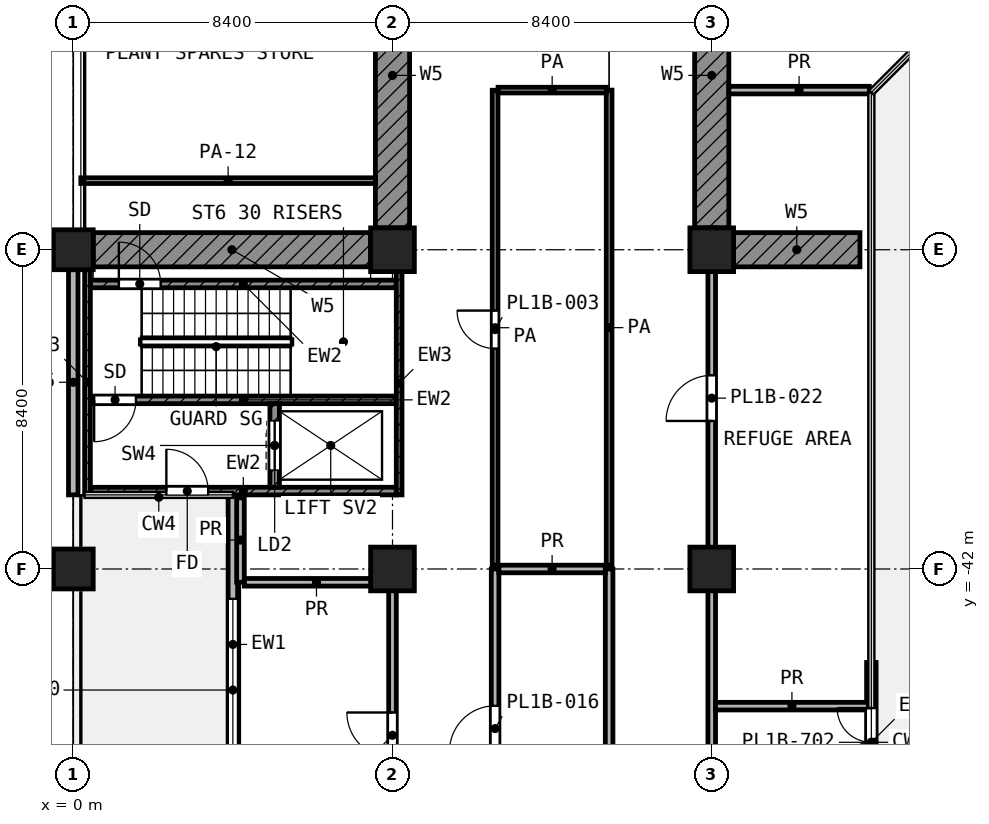
"""IFC4 building model, lengths in metres.
Left out: names, types, materials, properties, quantities, classifications, styles, units other than length and angle.
Written with IfcOpenShell. Run it as: python <this file> out.ifc"""

import sys

from ifc_helpers import new_model, si_unit, direction, frame, frame_2d, origin, origin_2d, place, context, subcontext, project, spatial, rectangle, extrude, element, fill, save


model = new_model("IFC4")
c1 = context("Model", 3, precision=1e-05, world=origin(), true_north=direction((0.0, 1.0)))
c2 = subcontext(c1, "Body", "Model", "MODEL_VIEW")
j1 = project(units=[si_unit("LENGTHUNIT", "METRE"), si_unit("PLANEANGLEUNIT", "RADIAN")], contexts=[c1])
p1 = place(None, origin())
s1 = spatial("IfcSite", under=j1, at=p1, CompositionType="ELEMENT")
p2 = place(p1, origin())
s2 = spatial("IfcBuilding", under=s1, at=p2, CompositionType="ELEMENT")
p3 = place(p2, frame((0.0, 0.0, 93.8)))
s3 = spatial("IfcBuildingStorey", under=s2, at=p3, CompositionType="ELEMENT", Elevation=93.8)
p4 = place(p3, frame((0.0, -33.6, 0.0), z_axis=(0.0, 0.0, 1.0), x_axis=(1.0, 0.0, 0.0)))
e1 = element("IfcColumn", 1, at=p4, inside=s3, PredefinedType="COLUMN", context=c2, shape_type="SweptSolid", body=[
    extrude(rectangle(XDim=1.05, YDim=1.05, at=origin_2d()), origin(), (0.0, 0.0, 1.0), 5.0),
])
for number, where, z_axis, x_axis in (
    (2, (8.4, -33.6, 0.0), (0.0, 0.0, 1.0), (1.0, 0.0, 0.0)),
    (3, (16.8, -33.6, 0.0), (0.0, 0.0, 1.0), (1.0, 0.0, 0.0)),
):
    element("IfcColumn", number, at=place(p3, frame(where, z_axis=z_axis, x_axis=x_axis)), inside=s3, PredefinedType="COLUMN", context=c2, shape_type="SweptSolid", body=[
        extrude(rectangle(XDim=1.15, YDim=1.15, at=origin_2d()), origin(), (0.0, 0.0, 1.0), 5.0),
    ])
p5 = place(p3, frame((0.0, -42.0, 0.0), z_axis=(0.0, 0.0, 1.0), x_axis=(1.0, 0.0, 0.0)))
e4 = element("IfcColumn", 4, at=p5, inside=s3, PredefinedType="COLUMN", context=c2, shape_type="SweptSolid", body=[
    extrude(rectangle(XDim=1.05, YDim=1.05, at=origin_2d()), origin(), (0.0, 0.0, 1.0), 5.0),
])
for number, where, z_axis, x_axis in (
    (5, (8.4, -42.0, 0.0), (0.0, 0.0, 1.0), (1.0, 0.0, 0.0)),
    (6, (16.8, -42.0, 0.0), (0.0, 0.0, 1.0), (1.0, 0.0, 0.0)),
):
    element("IfcColumn", number, at=place(p3, frame(where, z_axis=z_axis, x_axis=x_axis)), inside=s3, PredefinedType="COLUMN", context=c2, shape_type="SweptSolid", body=[
        extrude(rectangle(XDim=1.15, YDim=1.15, at=origin_2d()), origin(), (0.0, 0.0, 1.0), 5.0),
    ])
for number, where, z_axis, x_axis in (
    (7, (8.4, -25.0, 0.0), (0.0, 0.0, 1.0), (0.0, -1.0, 0.0)),
    (8, (16.8, -25.0, 0.0), (0.0, 0.0, 1.0), (0.0, -1.0, 0.0)),
):
    element("IfcWall", number, at=place(p3, frame(where, z_axis=z_axis, x_axis=x_axis)), inside=s3, PredefinedType="SHEAR", context=c2, shape_type="SweptSolid", body=[
        extrude(rectangle(XDim=8.025, YDim=0.9, at=frame_2d((4.012, 0.0))), origin(), (0.0, 0.0, 1.0), 4.4),
    ])
p6 = place(p3, frame((0.525, -33.6, 0.0), z_axis=(0.0, 0.0, 1.0), x_axis=(1.0, 0.0, 0.0)))
e9 = element("IfcWall", 9, at=p6, inside=s3, PredefinedType="SHEAR", context=c2, shape_type="SweptSolid", body=[
    extrude(rectangle(XDim=7.3, YDim=0.9, at=frame_2d((3.65, 0.0))), origin(), (0.0, 0.0, 1.0), 4.4),
])
p7 = place(p3, frame((17.375, -33.6, 0.0), z_axis=(0.0, 0.0, 1.0), x_axis=(1.0, 0.0, 0.0)))
e10 = element("IfcWall", 10, at=p7, inside=s3, PredefinedType="SHEAR", context=c2, shape_type="SweptSolid", body=[
    extrude(rectangle(XDim=3.325, YDim=0.9, at=frame_2d((1.663, 0.0))), origin(), (0.0, 0.0, 1.0), 4.4),
])
p8 = place(p3, frame((0.0, -34.125, 0.0), z_axis=(0.0, 0.0, 1.0), x_axis=(0.0, -1.0, 0.0)))
e11 = element("IfcWall", 11, at=p8, inside=s3, PredefinedType="SOLIDWALL", context=c2, shape_type="SweptSolid", body=[
    extrude(rectangle(XDim=5.925, YDim=0.25, at=frame_2d((2.962, 0.0))), origin(), (0.0, 0.0, 1.0), 3.0),
])
p9 = place(p3, frame((4.2, -40.05, 0.0), z_axis=(0.0, 0.0, 1.0), x_axis=(0.0, -1.0, 0.0)))
e12 = element("IfcWall", 12, at=p9, inside=s3, PredefinedType="SOLIDWALL", context=c2, shape_type="SweptSolid", body=[
    extrude(rectangle(XDim=7.87, YDim=0.25, at=frame_2d((3.935, 0.0))), origin(), (0.0, 0.0, 1.0), 4.4),
])
p10 = place(p9, frame((2.735, 0.0, 0.6)))
e13 = element("IfcOpeningElement", 13, at=p10, cuts=e12, PredefinedType="OPENING", context=c2, shape_type="SweptSolid", body=[
    extrude(rectangle(XDim=4.8, YDim=2.4, at=frame_2d((2.4, 1.2))), frame((0.0, 0.135, 0.0), z_axis=(0.0, -1.0, 0.0), x_axis=(1.0, 0.0, 0.0)), (0.0, 0.0, 1.0), 0.27),
])
p11 = place(p3, frame((21.0, -48.66, 0.0), z_axis=(0.0, 0.0, 1.0), x_axis=(0.0, 1.0, 0.0)))
e14 = element("IfcWall", 14, at=p11, inside=s3, PredefinedType="SOLIDWALL", context=c2, shape_type="SweptSolid", body=[
    extrude(rectangle(XDim=4.2, YDim=0.25, at=frame_2d((2.1, 0.0))), origin(), (0.0, 0.0, 1.0), 4.24),
])
p12 = place(p11, frame((1.2, 0.0, 0.0)))
e15 = element("IfcOpeningElement", 15, at=p12, cuts=e14, PredefinedType="OPENING", context=c2, shape_type="SweptSolid", body=[
    extrude(rectangle(XDim=1.8, YDim=2.1, at=frame_2d((0.9, 1.05))), frame((0.0, 0.135, 0.0), z_axis=(0.0, -1.0, 0.0), x_axis=(1.0, 0.0, 0.0)), (0.0, 0.0, 1.0), 0.27),
])
p13 = place(p3, frame((0.375, -40.05, 0.0), z_axis=(0.0, 0.0, 1.0), x_axis=(0.0, 1.0, 0.0)))
e16 = element("IfcWall", 16, at=p13, inside=s3, PredefinedType="SHEAR", context=c2, shape_type="SweptSolid", body=[
    extrude(rectangle(XDim=5.925, YDim=0.15, at=frame_2d((2.962, 0.0))), origin(), (0.0, 0.0, 1.0), 4.4),
])
p14 = place(p3, frame((8.575, -40.05, 0.0), z_axis=(0.0, 0.0, 1.0), x_axis=(0.0, 1.0, 0.0)))
e17 = element("IfcWall", 17, at=p14, inside=s3, PredefinedType="SHEAR", context=c2, shape_type="SweptSolid", body=[
    extrude(rectangle(XDim=5.875, YDim=0.15, at=frame_2d((2.938, 0.0))), origin(), (0.0, 0.0, 1.0), 4.4),
])
p15 = place(p3, frame((0.45, -34.5, 0.0), z_axis=(0.0, 0.0, 1.0), x_axis=(1.0, 0.0, 0.0)))
e18 = element("IfcWall", 18, at=p15, inside=s3, PredefinedType="SHEAR", context=c2, shape_type="SweptSolid", body=[
    extrude(rectangle(XDim=8.05, YDim=0.2, at=frame_2d((4.025, 0.0))), origin(), (0.0, 0.0, 1.0), 4.4),
])
p16 = place(p15, frame((0.75, 0.0, 0.0)))
e19 = element("IfcOpeningElement", 19, at=p16, cuts=e18, PredefinedType="OPENING", context=c2, shape_type="SweptSolid", body=[
    extrude(rectangle(XDim=1.1, YDim=2.1, at=frame_2d((0.55, 1.05))), frame((0.0, 0.11, 0.0), z_axis=(0.0, -1.0, 0.0), x_axis=(1.0, 0.0, 0.0)), (0.0, 0.0, 1.0), 0.22),
])
p17 = place(p3, frame((0.45, -37.55, 0.0), z_axis=(0.0, 0.0, 1.0), x_axis=(1.0, 0.0, 0.0)))
e20 = element("IfcWall", 20, at=p17, inside=s3, PredefinedType="SHEAR", context=c2, shape_type="SweptSolid", body=[
    extrude(rectangle(XDim=8.05, YDim=0.2, at=frame_2d((4.025, 0.0))), origin(), (0.0, 0.0, 1.0), 4.4),
])
p18 = place(p17, frame((0.1, 0.0, 0.0)))
e21 = element("IfcOpeningElement", 21, at=p18, cuts=e20, PredefinedType="OPENING", context=c2, shape_type="SweptSolid", body=[
    extrude(rectangle(XDim=1.1, YDim=2.1, at=frame_2d((0.55, 1.05))), frame((0.0, 0.11, 0.0), z_axis=(0.0, -1.0, 0.0), x_axis=(1.0, 0.0, 0.0)), (0.0, 0.0, 1.0), 0.22),
])
p19 = place(p3, frame((0.45, -39.95, 0.0), z_axis=(0.0, 0.0, 1.0), x_axis=(1.0, 0.0, 0.0)))
e22 = element("IfcWall", 22, at=p19, inside=s3, PredefinedType="SHEAR", context=c2, shape_type="SweptSolid", body=[
    extrude(rectangle(XDim=8.05, YDim=0.2, at=frame_2d((4.025, 0.0))), origin(), (0.0, 0.0, 1.0), 4.4),
])
p20 = place(p19, frame((2.0, 0.0, 0.0)))
e23 = element("IfcOpeningElement", 23, at=p20, cuts=e22, PredefinedType="OPENING", context=c2, shape_type="SweptSolid", body=[
    extrude(rectangle(XDim=1.1, YDim=2.1, at=frame_2d((0.55, 1.05))), frame((0.0, 0.11, 0.0), z_axis=(0.0, -1.0, 0.0), x_axis=(1.0, 0.0, 0.0)), (0.0, 0.0, 1.0), 0.22),
])
p21 = place(p3, frame((5.3, -39.85, 0.0), z_axis=(0.0, 0.0, 1.0), x_axis=(0.0, 1.0, 0.0)))
e24 = element("IfcWall", 24, at=p21, inside=s3, PredefinedType="SHEAR", context=c2, shape_type="SweptSolid", body=[
    extrude(rectangle(XDim=2.2, YDim=0.25, at=frame_2d((1.1, 0.0))), origin(), (0.0, 0.0, 1.0), 4.4),
])
p22 = place(p21, frame((0.45, 0.0, 0.0)))
e25 = element("IfcOpeningElement", 25, at=p22, cuts=e24, PredefinedType="OPENING", context=c2, shape_type="SweptSolid", body=[
    extrude(rectangle(XDim=1.3, YDim=2.1, at=frame_2d((0.65, 1.05))), frame((0.0, 0.135, 0.0), z_axis=(0.0, -1.0, 0.0), x_axis=(1.0, 0.0, 0.0)), (0.0, 0.0, 1.0), 0.27),
])
p23 = place(p3, frame((0.2, -31.782, 0.0), z_axis=(0.0, 0.0, 1.0), x_axis=(1.0, 0.0, 0.0)))
e26 = element("IfcWall", 26, at=p23, inside=s3, PredefinedType="PARTITIONING", context=c2, shape_type="SweptSolid", body=[
    extrude(rectangle(XDim=7.751, YDim=0.15, at=frame_2d((3.875, 0.0))), origin(), (0.0, 0.0, 1.0), 3.0),
])
p24 = place(p3, frame((11.178, -29.4, 0.0), z_axis=(0.0, 0.0, 1.0), x_axis=(1.0, 0.0, 0.0)))
e27 = element("IfcWall", 27, at=p24, inside=s3, PredefinedType="PARTITIONING", context=c2, shape_type="SweptSolid", body=[
    extrude(rectangle(XDim=2.847, YDim=0.15, at=frame_2d((1.423, 0.0))), origin(), (0.0, 0.0, 1.0), 4.4),
])
p25 = place(p3, frame((11.1, -41.9, 0.0), z_axis=(0.0, 0.0, 1.0), x_axis=(0.0, 1.0, 0.0)))
e28 = element("IfcWall", 28, at=p25, inside=s3, PredefinedType="PARTITIONING", context=c2, shape_type="SweptSolid", body=[
    extrude(rectangle(XDim=12.497, YDim=0.15, at=frame_2d((6.249, 0.0))), origin(), (0.0, 0.0, 1.0), 4.4),
])
p26 = place(p25, frame((5.699, 0.0, 0.0)))
e29 = element("IfcOpeningElement", 29, at=p26, cuts=e28, PredefinedType="OPENING", context=c2, shape_type="SweptSolid", body=[
    extrude(rectangle(XDim=1.0, YDim=2.1, at=frame_2d((0.5, 1.05))), frame((0.0, 0.085, 0.0), z_axis=(0.0, -1.0, 0.0), x_axis=(1.0, 0.0, 0.0)), (0.0, 0.0, 1.0), 0.17),
])
p27 = place(p3, frame((14.1, -41.9, 0.0), z_axis=(0.0, 0.0, 1.0), x_axis=(0.0, 1.0, 0.0)))
e30 = element("IfcWall", 30, at=p27, inside=s3, PredefinedType="PARTITIONING", context=c2, shape_type="SweptSolid", body=[
    extrude(rectangle(XDim=12.5, YDim=0.15, at=frame_2d((6.25, 0.0))), origin(), (0.0, 0.0, 1.0), 4.4),
])
p28 = place(p3, frame((16.9, -45.609, 0.0), z_axis=(0.0, 0.0, 1.0), x_axis=(1.0, 0.0, 0.0)))
e31 = element("IfcWall", 31, at=p28, inside=s3, PredefinedType="PARTITIONING", context=c2, shape_type="SweptSolid", body=[
    extrude(rectangle(XDim=4.02, YDim=0.2, at=frame_2d((2.01, 0.0))), origin(), (0.0, 0.0, 1.0), 4.4),
])
p29 = place(p3, frame((4.501, -42.35, 0.0), z_axis=(0.0, 0.0, 1.0), x_axis=(1.0, 0.0, 0.0)))
e32 = element("IfcWall", 32, at=p29, inside=s3, PredefinedType="PARTITIONING", context=c2, shape_type="SweptSolid", body=[
    extrude(rectangle(XDim=3.797, YDim=0.2, at=frame_2d((1.898, 0.0))), origin(), (0.0, 0.0, 1.0), 4.4),
])
p30 = place(p3, frame((11.2, -42.0, 0.0), z_axis=(0.0, 0.0, 1.0), x_axis=(1.0, 0.0, 0.0)))
e33 = element("IfcWall", 33, at=p30, inside=s3, PredefinedType="PARTITIONING", context=c2, shape_type="SweptSolid", body=[
    extrude(rectangle(XDim=2.8, YDim=0.2, at=frame_2d((1.4, 0.0))), origin(), (0.0, 0.0, 1.0), 4.4),
])
p31 = place(p3, frame((17.249, -29.4, 0.0), z_axis=(0.0, 0.0, 1.0), x_axis=(1.0, 0.0, 0.0)))
e34 = element("IfcWall", 34, at=p31, inside=s3, PredefinedType="PARTITIONING", context=c2, shape_type="SweptSolid", body=[
    extrude(rectangle(XDim=3.698, YDim=0.2, at=frame_2d((1.849, 0.0))), origin(), (0.0, 0.0, 1.0), 4.4),
])
p32 = place(p3, frame((4.4, -42.348, 0.0), z_axis=(0.0, 0.0, 1.0), x_axis=(0.0, 1.0, 0.0)))
e35 = element("IfcWall", 35, at=p32, inside=s3, PredefinedType="PARTITIONING", context=c2, shape_type="SweptSolid", body=[
    extrude(rectangle(XDim=2.218, YDim=0.2, at=frame_2d((1.109, 0.0))), origin(), (0.0, 0.0, 1.0), 4.4),
])
p33 = place(p3, frame((8.4, -67.121, 0.0), z_axis=(0.0, 0.0, 1.0), x_axis=(0.0, 1.0, 0.0)))
e36 = element("IfcWall", 36, at=p33, inside=s3, PredefinedType="PARTITIONING", context=c2, shape_type="SweptSolid", body=[
    extrude(rectangle(XDim=24.769, YDim=0.2, at=frame_2d((12.385, 0.0))), origin(), (0.0, 0.0, 1.0), 4.4),
])
p34 = place(p33, frame((20.145, 0.0, 0.0)))
e37 = element("IfcOpeningElement", 37, at=p34, cuts=e36, PredefinedType="OPENING", context=c2, shape_type="SweptSolid", body=[
    extrude(rectangle(XDim=1.2, YDim=2.1, at=frame_2d((0.6, 1.05))), frame((0.0, 0.11, 0.0), z_axis=(0.0, -1.0, 0.0), x_axis=(1.0, 0.0, 0.0)), (0.0, 0.0, 1.0), 0.22),
])
p35 = place(p33, frame((11.921, 0.0, 0.0)))
e38 = element("IfcOpeningElement", 38, at=p35, cuts=e36, PredefinedType="OPENING", context=c2, shape_type="SweptSolid", body=[
    extrude(rectangle(XDim=1.2, YDim=2.1, at=frame_2d((0.6, 1.05))), frame((0.0, 0.11, 0.0), z_axis=(0.0, -1.0, 0.0), x_axis=(1.0, 0.0, 0.0)), (0.0, 0.0, 1.0), 0.22),
])
p36 = place(p33, frame((3.52, 0.0, 0.0)))
e39 = element("IfcOpeningElement", 39, at=p36, cuts=e36, PredefinedType="OPENING", context=c2, shape_type="SweptSolid", body=[
    extrude(rectangle(XDim=1.2, YDim=2.1, at=frame_2d((0.6, 1.05))), frame((0.0, 0.11, 0.0), z_axis=(0.0, -1.0, 0.0), x_axis=(1.0, 0.0, 0.0)), (0.0, 0.0, 1.0), 0.22),
])
p37 = place(p3, frame((11.1, -64.497, 0.0), z_axis=(0.0, 0.0, 1.0), x_axis=(0.0, 1.0, 0.0)))
e40 = element("IfcWall", 40, at=p37, inside=s3, PredefinedType="PARTITIONING", context=c2, shape_type="SweptSolid", body=[
    extrude(rectangle(XDim=22.497, YDim=0.2, at=frame_2d((11.249, 0.0))), origin(), (0.0, 0.0, 1.0), 4.4),
])
p38 = place(p37, frame((17.697, 0.0, 0.0)))
e41 = element("IfcOpeningElement", 41, at=p38, cuts=e40, PredefinedType="OPENING", context=c2, shape_type="SweptSolid", body=[
    extrude(rectangle(XDim=1.2, YDim=2.1, at=frame_2d((0.6, 1.05))), frame((0.0, 0.11, 0.0), z_axis=(0.0, -1.0, 0.0), x_axis=(1.0, 0.0, 0.0)), (0.0, 0.0, 1.0), 0.22),
])
p39 = place(p37, frame((9.297, 0.0, 0.0)))
e42 = element("IfcOpeningElement", 42, at=p39, cuts=e40, PredefinedType="OPENING", context=c2, shape_type="SweptSolid", body=[
    extrude(rectangle(XDim=1.2, YDim=2.1, at=frame_2d((0.6, 1.05))), frame((0.0, 0.11, 0.0), z_axis=(0.0, -1.0, 0.0), x_axis=(1.0, 0.0, 0.0)), (0.0, 0.0, 1.0), 0.22),
])
p40 = place(p37, frame((2.248, 0.0, 0.0)))
e43 = element("IfcOpeningElement", 43, at=p40, cuts=e40, PredefinedType="OPENING", context=c2, shape_type="SweptSolid", body=[
    extrude(rectangle(XDim=1.2, YDim=2.1, at=frame_2d((0.6, 1.05))), frame((0.0, 0.11, 0.0), z_axis=(0.0, -1.0, 0.0), x_axis=(1.0, 0.0, 0.0)), (0.0, 0.0, 1.0), 0.22),
])
p41 = place(p3, frame((14.1, -64.5, 0.0), z_axis=(0.0, 0.0, 1.0), x_axis=(0.0, 1.0, 0.0)))
e44 = element("IfcWall", 44, at=p41, inside=s3, PredefinedType="PARTITIONING", context=c2, shape_type="SweptSolid", body=[
    extrude(rectangle(XDim=22.5, YDim=0.2, at=frame_2d((11.25, 0.0))), origin(), (0.0, 0.0, 1.0), 4.4),
])
p42 = place(p3, frame((16.8, -67.121, 0.0), z_axis=(0.0, 0.0, 1.0), x_axis=(0.0, 1.0, 0.0)))
e45 = element("IfcWall", 45, at=p42, inside=s3, PredefinedType="PARTITIONING", context=c2, shape_type="SweptSolid", body=[
    extrude(rectangle(XDim=34.096, YDim=0.2, at=frame_2d((17.048, 0.0))), origin(), (0.0, 0.0, 1.0), 4.4),
])
p43 = place(p42, frame((29.016, 0.0, 0.0)))
e46 = element("IfcOpeningElement", 46, at=p43, cuts=e45, PredefinedType="OPENING", context=c2, shape_type="SweptSolid", body=[
    extrude(rectangle(XDim=1.2, YDim=2.1, at=frame_2d((0.6, 1.05))), frame((0.0, 0.11, 0.0), z_axis=(0.0, -1.0, 0.0), x_axis=(1.0, 0.0, 0.0)), (0.0, 0.0, 1.0), 0.22),
])
p44 = place(p42, frame((12.366, 0.0, 0.0)))
e47 = element("IfcOpeningElement", 47, at=p44, cuts=e45, PredefinedType="OPENING", context=c2, shape_type="SweptSolid", body=[
    extrude(rectangle(XDim=1.2, YDim=2.1, at=frame_2d((0.6, 1.05))), frame((0.0, 0.11, 0.0), z_axis=(0.0, -1.0, 0.0), x_axis=(1.0, 0.0, 0.0)), (0.0, 0.0, 1.0), 0.22),
])
p45 = place(p42, frame((1.57, 0.0, 0.0)))
e48 = element("IfcOpeningElement", 48, at=p45, cuts=e45, PredefinedType="OPENING", context=c2, shape_type="SweptSolid", body=[
    extrude(rectangle(XDim=1.2, YDim=2.1, at=frame_2d((0.6, 1.05))), frame((0.0, 0.11, 0.0), z_axis=(0.0, -1.0, 0.0), x_axis=(1.0, 0.0, 0.0)), (0.0, 0.0, 1.0), 0.22),
])
p46 = place(p10, origin())
e49 = element("IfcWindow", 49, at=p46, inside=s3, PartitioningType="SINGLE_PANEL", PredefinedType="WINDOW", context=c2, shape_type="SweptSolid", body=[
    extrude(rectangle(XDim=4.8, YDim=2.4, at=frame_2d((2.4, 1.2))), frame((0.0, 0.03, 0.0), z_axis=(0.0, -1.0, 0.0), x_axis=(1.0, 0.0, 0.0)), (0.0, 0.0, 1.0), 0.06),
])
fill(e13, e49)
p47 = place(p12, origin())
e50 = element("IfcDoor", 50, at=p47, inside=s3, OperationType="DOUBLE_DOOR_SINGLE_SWING", PredefinedType="DOOR", context=c2, shape_type="SweptSolid", body=[
    extrude(rectangle(XDim=1.8, YDim=2.1, at=frame_2d((0.9, 1.05))), frame((0.0, 0.025, 0.0), z_axis=(0.0, -1.0, 0.0), x_axis=(1.0, 0.0, 0.0)), (0.0, 0.0, 1.0), 0.05),
])
fill(e15, e50)
p48 = place(p16, origin())
e51 = element("IfcDoor", 51, at=p48, inside=s3, OperationType="SINGLE_SWING_LEFT", PredefinedType="DOOR", context=c2, shape_type="SweptSolid", body=[
    extrude(rectangle(XDim=1.1, YDim=2.1, at=frame_2d((0.55, 1.05))), frame((0.0, 0.025, 0.0), z_axis=(0.0, -1.0, 0.0), x_axis=(1.0, 0.0, 0.0)), (0.0, 0.0, 1.0), 0.05),
])
fill(e19, e51)
p49 = place(p18, frame((1.1, 0.0, 0.0), z_axis=(0.0, 0.0, 1.0), x_axis=(-1.0, 0.0, 0.0)))
e52 = element("IfcDoor", 52, at=p49, inside=s3, OperationType="SINGLE_SWING_LEFT", PredefinedType="DOOR", context=c2, shape_type="SweptSolid", body=[
    extrude(rectangle(XDim=1.1, YDim=2.1, at=frame_2d((0.55, 1.05))), frame((0.0, 0.025, 0.0), z_axis=(0.0, -1.0, 0.0), x_axis=(1.0, 0.0, 0.0)), (0.0, 0.0, 1.0), 0.05),
])
fill(e21, e52)
p50 = place(p22, origin())
e53 = element("IfcDoor", 53, at=p50, inside=s3, OperationType="DOUBLE_DOOR_SLIDING", PredefinedType="DOOR", context=c2, shape_type="SweptSolid", body=[
    extrude(rectangle(XDim=1.3, YDim=2.1, at=frame_2d((0.65, 1.05))), frame((0.0, 0.025, 0.0), z_axis=(0.0, -1.0, 0.0), x_axis=(1.0, 0.0, 0.0)), (0.0, 0.0, 1.0), 0.05),
])
fill(e25, e53)
p51 = place(p20, origin())
e54 = element("IfcDoor", 54, at=p51, inside=s3, OperationType="SINGLE_SWING_LEFT", PredefinedType="DOOR", context=c2, shape_type="SweptSolid", body=[
    extrude(rectangle(XDim=1.1, YDim=2.1, at=frame_2d((0.55, 1.05))), frame((0.0, 0.025, 0.0), z_axis=(0.0, -1.0, 0.0), x_axis=(1.0, 0.0, 0.0)), (0.0, 0.0, 1.0), 0.05),
])
fill(e23, e54)
p52 = place(p34, origin())
e55 = element("IfcDoor", 55, at=p52, inside=s3, OperationType="SINGLE_SWING_RIGHT", PredefinedType="DOOR", context=c2, shape_type="SweptSolid", body=[
    extrude(rectangle(XDim=1.2, YDim=2.1, at=frame_2d((0.6, 1.05))), frame((0.0, 0.025, 0.0), z_axis=(0.0, -1.0, 0.0), x_axis=(1.0, 0.0, 0.0)), (0.0, 0.0, 1.0), 0.05),
])
fill(e37, e55)
p53 = place(p26, origin())
e56 = element("IfcDoor", 56, at=p53, inside=s3, OperationType="SINGLE_SWING_RIGHT", PredefinedType="DOOR", context=c2, shape_type="SweptSolid", body=[
    extrude(rectangle(XDim=1.0, YDim=2.1, at=frame_2d((0.5, 1.05))), frame((0.0, 0.025, 0.0), z_axis=(0.0, -1.0, 0.0), x_axis=(1.0, 0.0, 0.0)), (0.0, 0.0, 1.0), 0.05),
])
fill(e29, e56)
p54 = place(p38, origin())
e57 = element("IfcDoor", 57, at=p54, inside=s3, OperationType="SINGLE_SWING_LEFT", PredefinedType="DOOR", context=c2, shape_type="SweptSolid", body=[
    extrude(rectangle(XDim=1.2, YDim=2.1, at=frame_2d((0.6, 1.05))), frame((0.0, 0.025, 0.0), z_axis=(0.0, -1.0, 0.0), x_axis=(1.0, 0.0, 0.0)), (0.0, 0.0, 1.0), 0.05),
])
fill(e41, e57)
p55 = place(p43, origin())
e58 = element("IfcDoor", 58, at=p55, inside=s3, OperationType="SINGLE_SWING_LEFT", PredefinedType="DOOR", context=c2, shape_type="SweptSolid", body=[
    extrude(rectangle(XDim=1.2, YDim=2.1, at=frame_2d((0.6, 1.05))), frame((0.0, 0.025, 0.0), z_axis=(0.0, -1.0, 0.0), x_axis=(1.0, 0.0, 0.0)), (0.0, 0.0, 1.0), 0.05),
])
fill(e46, e58)
save(model, sys.argv[1])
